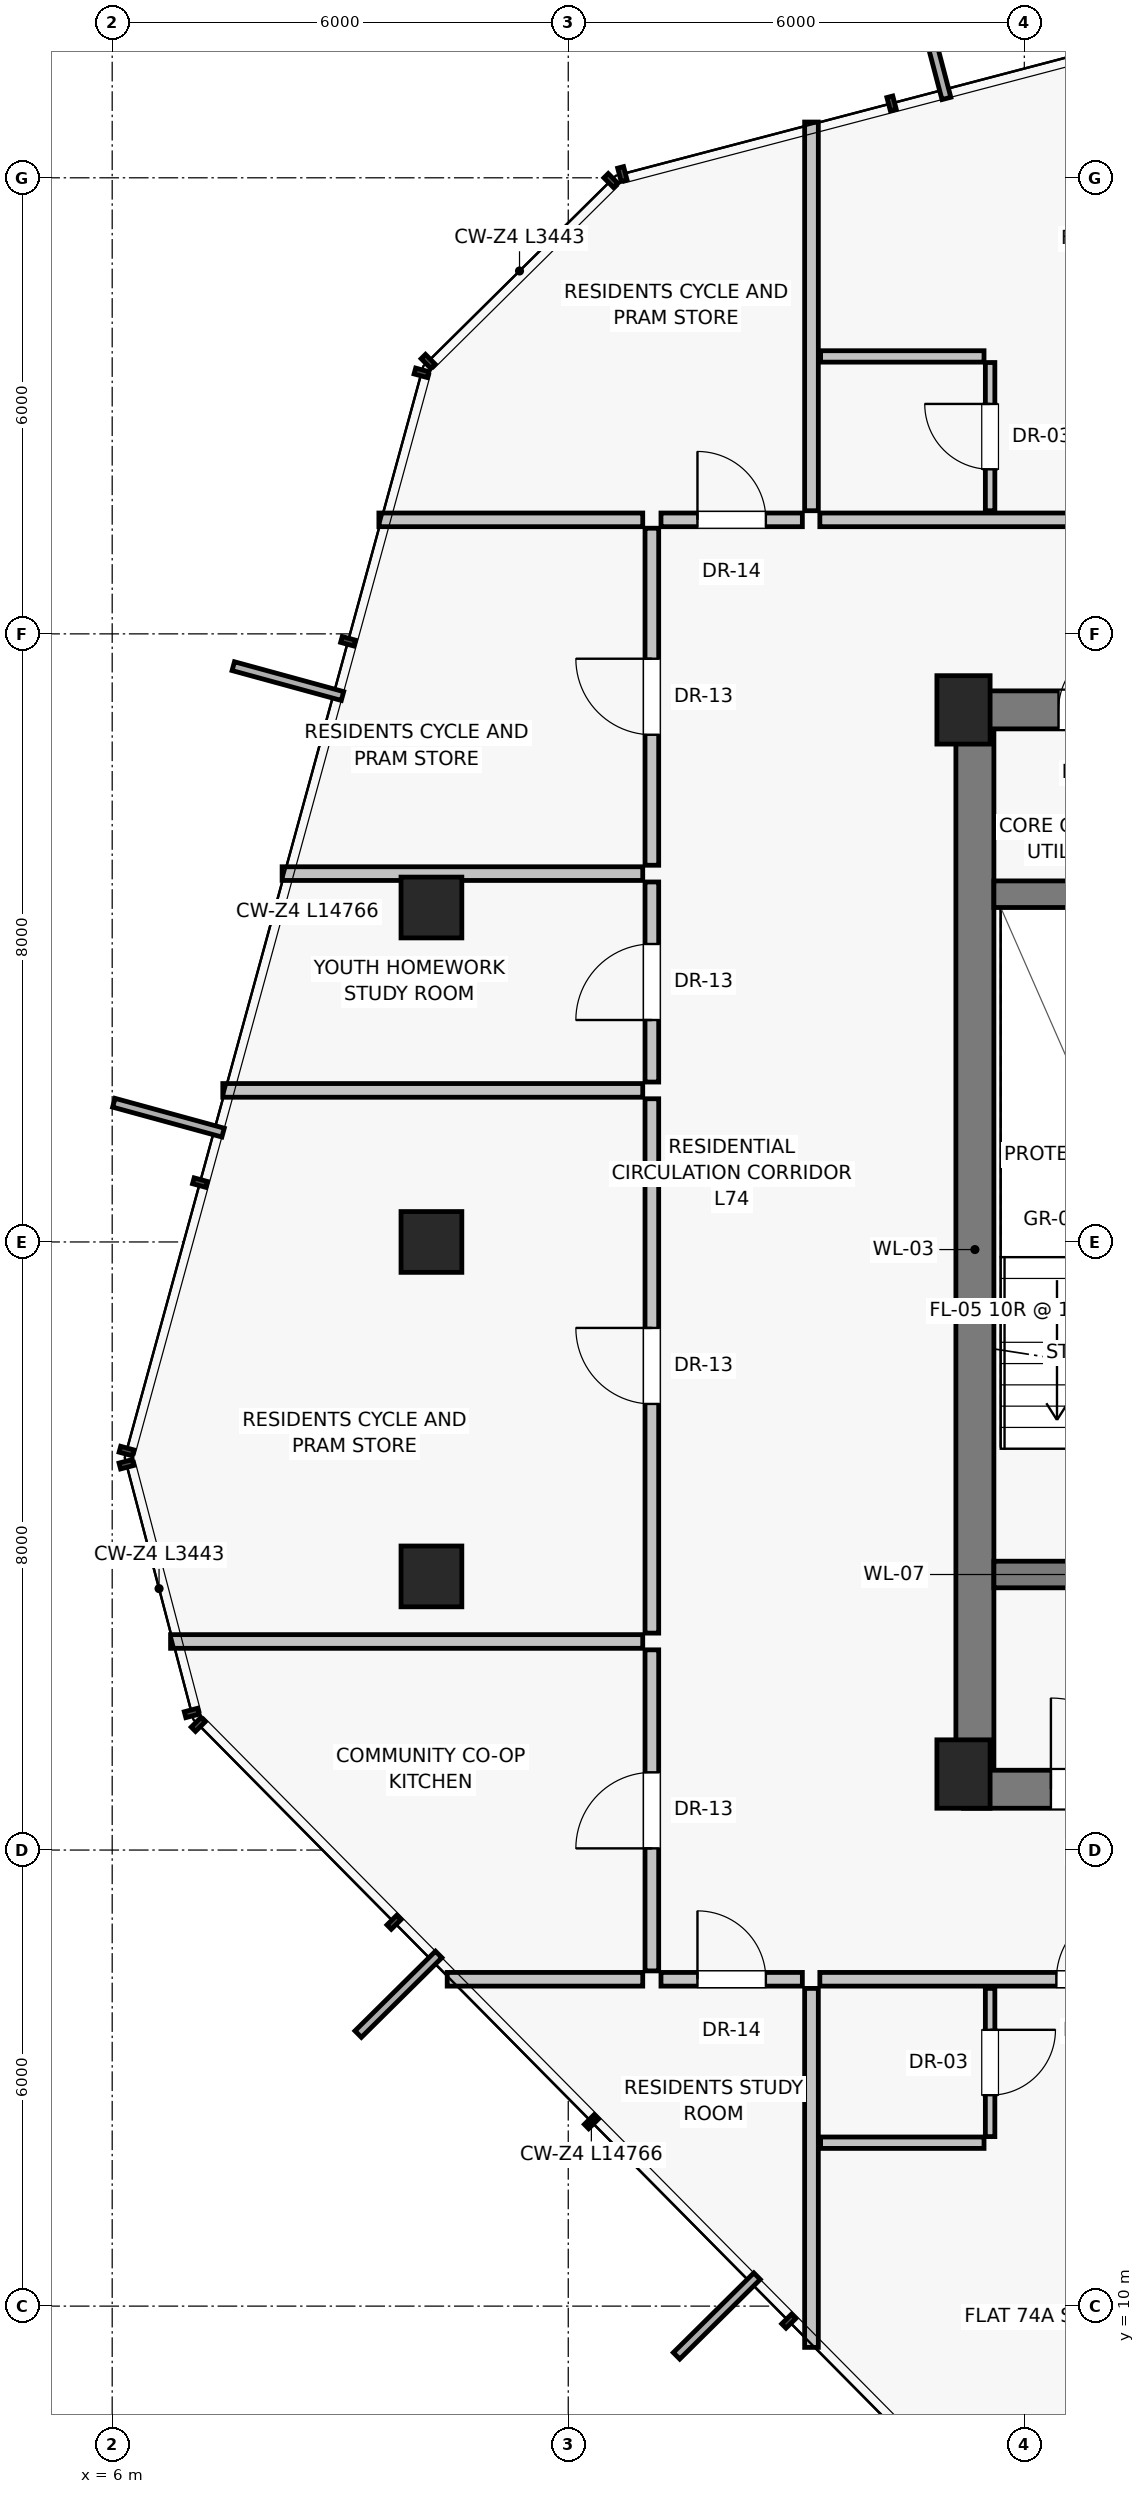
"""IFC4 building model, lengths in metres.
Left out: names, types, materials, properties, quantities, classifications, styles, units other than length and angle.
Written with IfcOpenShell. Run it as: python <this file> out.ifc"""

import sys

from ifc_helpers import new_model, si_unit, direction, frame, frame_2d, origin, origin_2d, place, context, subcontext, project, spatial, rectangle, extrude, source, transform, mapped, element, fill, save


model = new_model("IFC4")
c1 = context("Model", 3, precision=1e-05, world=origin(), true_north=direction((0.0, 1.0)))
c2 = subcontext(c1, "Body", "Model", "MODEL_VIEW")
j1 = project(units=[si_unit("LENGTHUNIT", "METRE"), si_unit("PLANEANGLEUNIT", "RADIAN")], contexts=[c1])
p1 = place(None, origin())
s1 = spatial("IfcSite", under=j1, at=p1, CompositionType="ELEMENT")
p2 = place(p1, origin())
s2 = spatial("IfcBuilding", under=s1, at=p2, CompositionType="ELEMENT")
p3 = place(p2, frame((0.0, 0.0, 261.0)))
s3 = spatial("IfcBuildingStorey", under=s2, at=p3, CompositionType="ELEMENT", Elevation=261.0)
for number, where, z_axis, x_axis in (
    (1, (17.2, 17.0, 0.0), (0.0, 0.0, 1.0), (1.0, 0.0, 0.0)),
    (2, (17.2, 31.0, 0.0), (0.0, 0.0, 1.0), (1.0, 0.0, 0.0)),
):
    element("IfcColumn", number, at=place(p3, frame(where, z_axis=z_axis, x_axis=x_axis)), inside=s3, PredefinedType="PILASTER", context=c2, shape_type="SweptSolid", body=[
        extrude(rectangle(XDim=0.7, YDim=0.9, at=origin_2d()), origin(), (0.0, 0.0, 1.0), 3.25),
    ])
for number, where, z_axis, x_axis in (
    (3, (10.2, 28.4, 0.0), (0.0, 0.0, 1.0), (1.0, 0.0, 0.0)),
    (4, (10.2, 24.0, 0.0), (0.0, 0.0, 1.0), (1.0, 0.0, 0.0)),
    (5, (10.2, 19.6, 0.0), (0.0, 0.0, 1.0), (1.0, 0.0, 0.0)),
):
    element("IfcColumn", number, at=place(p3, frame(where, z_axis=z_axis, x_axis=x_axis)), inside=s3, PredefinedType="COLUMN", context=c2, shape_type="SweptSolid", body=[
        extrude(rectangle(XDim=0.8, YDim=0.8, at=origin_2d()), origin(), (0.0, 0.0, 1.0), 3.25),
    ])
p4 = place(p3, frame((17.35, 16.8, 0.0), z_axis=(0.0, 0.0, 1.0), x_axis=(0.0, 1.0, 0.0)))
e6 = element("IfcWall", 6, at=p4, inside=s3, PredefinedType="SHEAR", context=c2, shape_type="SweptSolid", body=[
    extrude(rectangle(XDim=14.2, YDim=0.5, at=frame_2d((7.1, 0.0))), origin(), (0.0, 0.0, 1.0), 2.93),
])
p5 = place(p3, frame((17.2, 16.8, 0.0), z_axis=(0.0, 0.0, 1.0), x_axis=(1.0, 0.0, 0.0)))
e7 = element("IfcWall", 7, at=p5, inside=s3, PredefinedType="SHEAR", context=c2, shape_type="SweptSolid", body=[
    extrude(rectangle(XDim=5.85, YDim=0.5, at=frame_2d((2.925, 0.0))), origin(), (0.0, 0.0, 1.0), 2.93),
])
p6 = place(p5, frame((1.15, 0.0, 0.0)))
e8 = element("IfcOpeningElement", 8, at=p6, cuts=e7, PredefinedType="OPENING", context=c2, shape_type="SweptSolid", body=[
    extrude(rectangle(XDim=1.2, YDim=2.03, at=frame_2d((0.6, 1.015))), frame((0.0, 0.26, 0.0), z_axis=(0.0, -1.0, 0.0), x_axis=(1.0, 0.0, 0.0)), (0.0, 0.0, 1.0), 0.52),
])
p7 = place(p3, frame((17.2, 31.0, 0.0), z_axis=(0.0, 0.0, 1.0), x_axis=(1.0, 0.0, 0.0)))
e9 = element("IfcWall", 9, at=p7, inside=s3, PredefinedType="SHEAR", context=c2, shape_type="SweptSolid", body=[
    extrude(rectangle(XDim=3.8, YDim=0.5, at=frame_2d((1.9, 0.0))), origin(), (0.0, 0.0, 1.0), 2.93),
])
p8 = place(p7, frame((1.25, 0.0, 0.0)))
e10 = element("IfcOpeningElement", 10, at=p8, cuts=e9, PredefinedType="OPENING", context=c2, shape_type="SweptSolid", body=[
    extrude(rectangle(XDim=0.86, YDim=2.01, at=frame_2d((0.43, 1.005))), frame((0.0, 0.26, 0.0), z_axis=(0.0, -1.0, 0.0), x_axis=(1.0, 0.0, 0.0)), (0.0, 0.0, 1.0), 0.52),
])
p9 = place(p3, frame((17.6, 19.625, 0.0), z_axis=(0.0, 0.0, 1.0), x_axis=(1.0, 0.0, 0.0)))
e11 = element("IfcWall", 11, at=p9, inside=s3, PredefinedType="SHEAR", context=c2, shape_type="SweptSolid", body=[
    extrude(rectangle(XDim=3.375, YDim=0.35, at=frame_2d((1.688, 0.0))), origin(), (0.0, 0.0, 1.0), 2.93),
])
p10 = place(p9, frame((1.05, 0.0, 0.0)))
e12 = element("IfcOpeningElement", 12, at=p10, cuts=e11, PredefinedType="OPENING", context=c2, shape_type="SweptSolid", body=[
    extrude(rectangle(XDim=1.1, YDim=2.03, at=frame_2d((0.55, 1.015))), frame((0.0, 0.185, 0.0), z_axis=(0.0, -1.0, 0.0), x_axis=(1.0, 0.0, 0.0)), (0.0, 0.0, 1.0), 0.37),
])
p11 = place(p3, frame((17.6, 28.575, 0.0), z_axis=(0.0, 0.0, 1.0), x_axis=(1.0, 0.0, 0.0)))
e13 = element("IfcWall", 13, at=p11, inside=s3, PredefinedType="SHEAR", context=c2, shape_type="SweptSolid", body=[
    extrude(rectangle(XDim=3.375, YDim=0.35, at=frame_2d((1.688, 0.0))), origin(), (0.0, 0.0, 1.0), 2.93),
])
p12 = place(p3, frame((15.2, 14.18, 0.0), z_axis=(0.0, 0.0, 1.0), x_axis=(0.0, -1.0, 0.0)))
e14 = element("IfcWall", 14, at=p12, inside=s3, PredefinedType="PARTITIONING", context=c2, shape_type="SweptSolid", body=[
    extrude(rectangle(XDim=4.723, YDim=0.18, at=frame_2d((2.361, 0.0))), origin(), (0.0, 0.0, 1.0), 2.93),
])
p13 = place(p3, frame((15.31, 14.3, 0.0), z_axis=(0.0, 0.0, 1.0), x_axis=(1.0, 0.0, 0.0)))
e15 = element("IfcWall", 15, at=p13, inside=s3, PredefinedType="PARTITIONING", context=c2, shape_type="SweptSolid", body=[
    extrude(rectangle(XDim=5.285, YDim=0.18, at=frame_2d((2.643, 0.0))), origin(), (0.0, 0.0, 1.0), 2.93),
])
p14 = place(p13, frame((3.112, 0.0, 0.0)))
e16 = element("IfcOpeningElement", 16, at=p14, cuts=e15, PredefinedType="OPENING", context=c2, shape_type="SweptSolid", body=[
    extrude(rectangle(XDim=0.95, YDim=2.02, at=frame_2d((0.475, 1.01))), frame((0.0, 0.1, 0.0), z_axis=(0.0, -1.0, 0.0), x_axis=(1.0, 0.0, 0.0)), (0.0, 0.0, 1.0), 0.2),
])
p15 = place(p3, frame((17.55, 14.18, 0.0), z_axis=(0.0, 0.0, 1.0), x_axis=(0.0, -1.0, 0.0)))
e17 = element("IfcWall", 17, at=p15, inside=s3, PredefinedType="PARTITIONING", context=c2, shape_type="SweptSolid", body=[
    extrude(rectangle(XDim=1.95, YDim=0.125, at=frame_2d((0.975, 0.0))), origin(), (0.0, 0.0, 1.0), 2.93),
])
p16 = place(p15, frame((0.545, 0.0, 0.0)))
e18 = element("IfcOpeningElement", 18, at=p16, cuts=e17, PredefinedType="OPENING", context=c2, shape_type="SweptSolid", body=[
    extrude(rectangle(XDim=0.86, YDim=2.01, at=frame_2d((0.43, 1.005))), frame((0.0, 0.073, 0.0), z_axis=(0.0, -1.0, 0.0), x_axis=(1.0, 0.0, 0.0)), (0.0, 0.0, 1.0), 0.145),
])
p17 = place(p3, frame((15.32, 12.15, 0.0), z_axis=(0.0, 0.0, 1.0), x_axis=(1.0, 0.0, 0.0)))
e19 = element("IfcWall", 19, at=p17, inside=s3, PredefinedType="PARTITIONING", context=c2, shape_type="SweptSolid", body=[
    extrude(rectangle(XDim=2.15, YDim=0.15, at=frame_2d((1.075, 0.0))), origin(), (0.0, 0.0, 1.0), 2.93),
])
p18 = place(p3, frame((15.2, 33.62, 0.0), z_axis=(0.0, 0.0, 1.0), x_axis=(0.0, 1.0, 0.0)))
e20 = element("IfcWall", 20, at=p18, inside=s3, PredefinedType="PARTITIONING", context=c2, shape_type="SweptSolid", body=[
    extrude(rectangle(XDim=5.114, YDim=0.18, at=frame_2d((2.557, 0.0))), origin(), (0.0, 0.0, 1.0), 2.93),
])
p19 = place(p3, frame((15.31, 33.5, 0.0), z_axis=(0.0, 0.0, 1.0), x_axis=(1.0, 0.0, 0.0)))
e21 = element("IfcWall", 21, at=p19, inside=s3, PredefinedType="PARTITIONING", context=c2, shape_type="SweptSolid", body=[
    extrude(rectangle(XDim=6.7, YDim=0.18, at=frame_2d((3.35, 0.0))), origin(), (0.0, 0.0, 1.0), 2.93),
])
p20 = place(p19, frame((4.159, 0.0, 0.0)))
e22 = element("IfcOpeningElement", 22, at=p20, cuts=e21, PredefinedType="OPENING", context=c2, shape_type="SweptSolid", body=[
    extrude(rectangle(XDim=0.95, YDim=2.02, at=frame_2d((0.475, 1.01))), frame((0.0, 0.1, 0.0), z_axis=(0.0, -1.0, 0.0), x_axis=(1.0, 0.0, 0.0)), (0.0, 0.0, 1.0), 0.2),
])
p21 = place(p3, frame((17.55, 33.62, 0.0), z_axis=(0.0, 0.0, 1.0), x_axis=(0.0, 1.0, 0.0)))
e23 = element("IfcWall", 23, at=p21, inside=s3, PredefinedType="PARTITIONING", context=c2, shape_type="SweptSolid", body=[
    extrude(rectangle(XDim=1.95, YDim=0.125, at=frame_2d((0.975, 0.0))), origin(), (0.0, 0.0, 1.0), 2.93),
])
p22 = place(p21, frame((0.545, 0.0, 0.0)))
e24 = element("IfcOpeningElement", 24, at=p22, cuts=e23, PredefinedType="OPENING", context=c2, shape_type="SweptSolid", body=[
    extrude(rectangle(XDim=0.86, YDim=2.01, at=frame_2d((0.43, 1.005))), frame((0.0, 0.073, 0.0), z_axis=(0.0, -1.0, 0.0), x_axis=(1.0, 0.0, 0.0)), (0.0, 0.0, 1.0), 0.145),
])
p23 = place(p3, frame((15.32, 35.65, 0.0), z_axis=(0.0, 0.0, 1.0), x_axis=(1.0, 0.0, 0.0)))
e25 = element("IfcWall", 25, at=p23, inside=s3, PredefinedType="PARTITIONING", context=c2, shape_type="SweptSolid", body=[
    extrude(rectangle(XDim=2.15, YDim=0.15, at=frame_2d((1.075, 0.0))), origin(), (0.0, 0.0, 1.0), 2.93),
])
p24 = place(p3, frame((12.98, 14.3, 0.0), z_axis=(0.0, 0.0, 1.0), x_axis=(-1.0, 0.0, 0.0)))
e26 = element("IfcWall", 26, at=p24, inside=s3, PredefinedType="PARTITIONING", context=c2, shape_type="SweptSolid", body=[
    extrude(rectangle(XDim=2.573, YDim=0.18, at=frame_2d((1.286, 0.0))), origin(), (0.0, 0.0, 1.0), 2.93),
])
p25 = place(p3, frame((12.98, 33.5, 0.0), z_axis=(0.0, 0.0, 1.0), x_axis=(-1.0, 0.0, 0.0)))
e27 = element("IfcWall", 27, at=p25, inside=s3, PredefinedType="PARTITIONING", context=c2, shape_type="SweptSolid", body=[
    extrude(rectangle(XDim=3.471, YDim=0.18, at=frame_2d((1.736, 0.0))), origin(), (0.0, 0.0, 1.0), 2.93),
])
p26 = place(p3, frame((13.1, 14.41, 0.0), z_axis=(0.0, 0.0, 1.0), x_axis=(0.0, 1.0, 0.0)))
e28 = element("IfcWall", 28, at=p26, inside=s3, PredefinedType="PARTITIONING", context=c2, shape_type="SweptSolid", body=[
    extrude(rectangle(XDim=4.224, YDim=0.18, at=frame_2d((2.112, 0.0))), origin(), (0.0, 0.0, 1.0), 2.577),
])
p27 = place(p26, frame((1.612, 0.0, 0.0)))
e29 = element("IfcOpeningElement", 29, at=p27, cuts=e28, PredefinedType="OPENING", context=c2, shape_type="SweptSolid", body=[
    extrude(rectangle(XDim=1.0, YDim=2.01, at=frame_2d((0.5, 1.005))), frame((0.0, 0.1, 0.0), z_axis=(0.0, -1.0, 0.0), x_axis=(1.0, 0.0, 0.0)), (0.0, 0.0, 1.0), 0.2),
])
p28 = place(p3, frame((13.1, 18.854, 0.0), z_axis=(0.0, 0.0, 1.0), x_axis=(0.0, 1.0, 0.0)))
e30 = element("IfcWall", 30, at=p28, inside=s3, PredefinedType="PARTITIONING", context=c2, shape_type="SweptSolid", body=[
    extrude(rectangle(XDim=7.03, YDim=0.18, at=frame_2d((3.515, 0.0))), origin(), (0.0, 0.0, 1.0), 2.577),
])
p29 = place(p28, frame((3.015, 0.0, 0.0)))
e31 = element("IfcOpeningElement", 31, at=p29, cuts=e30, PredefinedType="OPENING", context=c2, shape_type="SweptSolid", body=[
    extrude(rectangle(XDim=1.0, YDim=2.01, at=frame_2d((0.5, 1.005))), frame((0.0, 0.1, 0.0), z_axis=(0.0, -1.0, 0.0), x_axis=(1.0, 0.0, 0.0)), (0.0, 0.0, 1.0), 0.2),
])
p30 = place(p3, frame((12.98, 18.744, 0.0), z_axis=(0.0, 0.0, 1.0), x_axis=(-1.0, 0.0, 0.0)))
e32 = element("IfcWall", 32, at=p30, inside=s3, PredefinedType="PARTITIONING", context=c2, shape_type="SweptSolid", body=[
    extrude(rectangle(XDim=6.212, YDim=0.18, at=frame_2d((3.106, 0.0))), origin(), (0.0, 0.0, 1.0), 2.93),
])
p31 = place(p3, frame((12.98, 25.994, 0.0), z_axis=(0.0, 0.0, 1.0), x_axis=(-1.0, 0.0, 0.0)))
e33 = element("IfcWall", 33, at=p31, inside=s3, PredefinedType="PARTITIONING", context=c2, shape_type="SweptSolid", body=[
    extrude(rectangle(XDim=5.525, YDim=0.18, at=frame_2d((2.762, 0.0))), origin(), (0.0, 0.0, 1.0), 2.93),
])
p32 = place(p3, frame((13.1, 26.104, 0.0), z_axis=(0.0, 0.0, 1.0), x_axis=(0.0, 1.0, 0.0)))
e34 = element("IfcWall", 34, at=p32, inside=s3, PredefinedType="PARTITIONING", context=c2, shape_type="SweptSolid", body=[
    extrude(rectangle(XDim=2.632, YDim=0.18, at=frame_2d((1.316, 0.0))), origin(), (0.0, 0.0, 1.0), 2.577),
])
p33 = place(p32, frame((0.816, 0.0, 0.0)))
e35 = element("IfcOpeningElement", 35, at=p33, cuts=e34, PredefinedType="OPENING", context=c2, shape_type="SweptSolid", body=[
    extrude(rectangle(XDim=1.0, YDim=2.01, at=frame_2d((0.5, 1.005))), frame((0.0, 0.1, 0.0), z_axis=(0.0, -1.0, 0.0), x_axis=(1.0, 0.0, 0.0)), (0.0, 0.0, 1.0), 0.2),
])
p34 = place(p3, frame((13.1, 28.956, 0.0), z_axis=(0.0, 0.0, 1.0), x_axis=(0.0, 1.0, 0.0)))
e36 = element("IfcWall", 36, at=p34, inside=s3, PredefinedType="PARTITIONING", context=c2, shape_type="SweptSolid", body=[
    extrude(rectangle(XDim=4.434, YDim=0.18, at=frame_2d((2.217, 0.0))), origin(), (0.0, 0.0, 1.0), 2.577),
])
p35 = place(p34, frame((1.717, 0.0, 0.0)))
e37 = element("IfcOpeningElement", 37, at=p35, cuts=e36, PredefinedType="OPENING", context=c2, shape_type="SweptSolid", body=[
    extrude(rectangle(XDim=1.0, YDim=2.01, at=frame_2d((0.5, 1.005))), frame((0.0, 0.1, 0.0), z_axis=(0.0, -1.0, 0.0), x_axis=(1.0, 0.0, 0.0)), (0.0, 0.0, 1.0), 0.2),
])
p36 = place(p3, frame((12.98, 28.846, 0.0), z_axis=(0.0, 0.0, 1.0), x_axis=(-1.0, 0.0, 0.0)))
e38 = element("IfcWall", 38, at=p36, inside=s3, PredefinedType="PARTITIONING", context=c2, shape_type="SweptSolid", body=[
    extrude(rectangle(XDim=4.744, YDim=0.18, at=frame_2d((2.372, 0.0))), origin(), (0.0, 0.0, 1.0), 2.93),
])
p37 = place(p3, frame((13.22, 14.3, 0.0), z_axis=(0.0, 0.0, 1.0), x_axis=(1.0, 0.0, 0.0)))
e39 = element("IfcWall", 39, at=p37, inside=s3, PredefinedType="PARTITIONING", context=c2, shape_type="SweptSolid", body=[
    extrude(rectangle(XDim=1.86, YDim=0.18, at=frame_2d((0.93, 0.0))), origin(), (0.0, 0.0, 1.0), 2.93),
])
p38 = place(p37, frame((0.48, 0.0, 0.0)))
e40 = element("IfcOpeningElement", 40, at=p38, cuts=e39, PredefinedType="OPENING", context=c2, shape_type="SweptSolid", body=[
    extrude(rectangle(XDim=0.9, YDim=2.01, at=frame_2d((0.45, 1.005))), frame((0.0, 0.1, 0.0), z_axis=(0.0, -1.0, 0.0), x_axis=(1.0, 0.0, 0.0)), (0.0, 0.0, 1.0), 0.2),
])
p39 = place(p3, frame((13.22, 33.5, 0.0), z_axis=(0.0, 0.0, 1.0), x_axis=(1.0, 0.0, 0.0)))
e41 = element("IfcWall", 41, at=p39, inside=s3, PredefinedType="PARTITIONING", context=c2, shape_type="SweptSolid", body=[
    extrude(rectangle(XDim=1.86, YDim=0.18, at=frame_2d((0.93, 0.0))), origin(), (0.0, 0.0, 1.0), 2.93),
])
p40 = place(p39, frame((0.48, 0.0, 0.0)))
e42 = element("IfcOpeningElement", 42, at=p40, cuts=e41, PredefinedType="OPENING", context=c2, shape_type="SweptSolid", body=[
    extrude(rectangle(XDim=0.9, YDim=2.01, at=frame_2d((0.45, 1.005))), frame((0.0, 0.1, 0.0), z_axis=(0.0, -1.0, 0.0), x_axis=(1.0, 0.0, 0.0)), (0.0, 0.0, 1.0), 0.2),
])
m1 = source(origin(), c2, "Body", "SweptSolid", [
    extrude(rectangle(XDim=1.2, YDim=2.03, at=frame_2d((0.6, 1.015))), frame((0.0, 0.025, 0.0), z_axis=(0.0, -1.0, 0.0), x_axis=(1.0, 0.0, 0.0)), (0.0, 0.0, 1.0), 0.05),
])
p41 = place(p6, origin())
e43 = element("IfcDoor", 43, at=p41, inside=s3, OperationType="SINGLE_SWING_LEFT", PredefinedType="DOOR", context=c2, shape_type="MappedRepresentation", body=[
    mapped(m1, transform((0.0, 0.0, 0.0), scale=1.0)),
])
fill(e8, e43)
m2 = source(origin(), c2, "Body", "SweptSolid", [
    extrude(rectangle(XDim=0.86, YDim=2.01, at=frame_2d((0.43, 1.005))), frame((0.0, 0.025, 0.0), z_axis=(0.0, -1.0, 0.0), x_axis=(1.0, 0.0, 0.0)), (0.0, 0.0, 1.0), 0.05),
])
p42 = place(p8, origin())
e44 = element("IfcDoor", 44, at=p42, inside=s3, OperationType="SINGLE_SWING_RIGHT", PredefinedType="DOOR", context=c2, shape_type="MappedRepresentation", body=[
    mapped(m2, transform((0.0, 0.0, 0.0), scale=1.0)),
])
fill(e10, e44)
m3 = source(origin(), c2, "Body", "SweptSolid", [
    extrude(rectangle(XDim=0.95, YDim=2.02, at=frame_2d((0.475, 1.01))), frame((0.0, 0.025, 0.0), z_axis=(0.0, -1.0, 0.0), x_axis=(1.0, 0.0, 0.0)), (0.0, 0.0, 1.0), 0.05),
])
p43 = place(p14, origin())
e45 = element("IfcDoor", 45, at=p43, inside=s3, OperationType="SINGLE_SWING_RIGHT", PredefinedType="DOOR", context=c2, shape_type="MappedRepresentation", body=[
    mapped(m3, transform((0.0, 0.0, 0.0), scale=1.0)),
])
fill(e16, e45)
p44 = place(p16, origin())
e46 = element("IfcDoor", 46, at=p44, inside=s3, OperationType="SINGLE_SWING_LEFT", PredefinedType="DOOR", context=c2, shape_type="MappedRepresentation", body=[
    mapped(m2, transform((0.0, 0.0, 0.0), scale=1.0)),
])
fill(e18, e46)
p45 = place(p22, origin())
e47 = element("IfcDoor", 47, at=p45, inside=s3, OperationType="SINGLE_SWING_RIGHT", PredefinedType="DOOR", context=c2, shape_type="MappedRepresentation", body=[
    mapped(m2, transform((0.0, 0.0, 0.0), scale=1.0)),
])
fill(e24, e47)
m4 = source(origin(), c2, "Body", "SweptSolid", [
    extrude(rectangle(XDim=1.0, YDim=2.01, at=frame_2d((0.5, 1.005))), frame((0.0, 0.025, 0.0), z_axis=(0.0, -1.0, 0.0), x_axis=(1.0, 0.0, 0.0)), (0.0, 0.0, 1.0), 0.05),
])
p46 = place(p27, origin())
e48 = element("IfcDoor", 48, at=p46, inside=s3, OperationType="SINGLE_SWING_LEFT", PredefinedType="DOOR", context=c2, shape_type="MappedRepresentation", body=[
    mapped(m4, transform((0.0, 0.0, 0.0), scale=1.0)),
])
fill(e29, e48)
p47 = place(p29, origin())
e49 = element("IfcDoor", 49, at=p47, inside=s3, OperationType="SINGLE_SWING_RIGHT", PredefinedType="DOOR", context=c2, shape_type="MappedRepresentation", body=[
    mapped(m4, transform((0.0, 0.0, 0.0), scale=1.0)),
])
fill(e31, e49)
p48 = place(p33, origin())
e50 = element("IfcDoor", 50, at=p48, inside=s3, OperationType="SINGLE_SWING_LEFT", PredefinedType="DOOR", context=c2, shape_type="MappedRepresentation", body=[
    mapped(m4, transform((0.0, 0.0, 0.0), scale=1.0)),
])
fill(e35, e50)
p49 = place(p35, origin())
e51 = element("IfcDoor", 51, at=p49, inside=s3, OperationType="SINGLE_SWING_RIGHT", PredefinedType="DOOR", context=c2, shape_type="MappedRepresentation", body=[
    mapped(m4, transform((0.0, 0.0, 0.0), scale=1.0)),
])
fill(e37, e51)
m5 = source(origin(), c2, "Body", "SweptSolid", [
    extrude(rectangle(XDim=0.9, YDim=2.01, at=frame_2d((0.45, 1.005))), frame((0.0, 0.025, 0.0), z_axis=(0.0, -1.0, 0.0), x_axis=(1.0, 0.0, 0.0)), (0.0, 0.0, 1.0), 0.05),
])
p50 = place(p38, origin())
e52 = element("IfcDoor", 52, at=p50, inside=s3, OperationType="SINGLE_SWING_LEFT", PredefinedType="DOOR", context=c2, shape_type="MappedRepresentation", body=[
    mapped(m5, transform((0.0, 0.0, 0.0), scale=1.0)),
])
fill(e40, e52)
p51 = place(p40, origin())
e53 = element("IfcDoor", 53, at=p51, inside=s3, OperationType="SINGLE_SWING_LEFT", PredefinedType="DOOR", context=c2, shape_type="MappedRepresentation", body=[
    mapped(m5, transform((0.0, 0.0, 0.0), scale=1.0)),
])
fill(e42, e53)
save(model, sys.argv[1])
